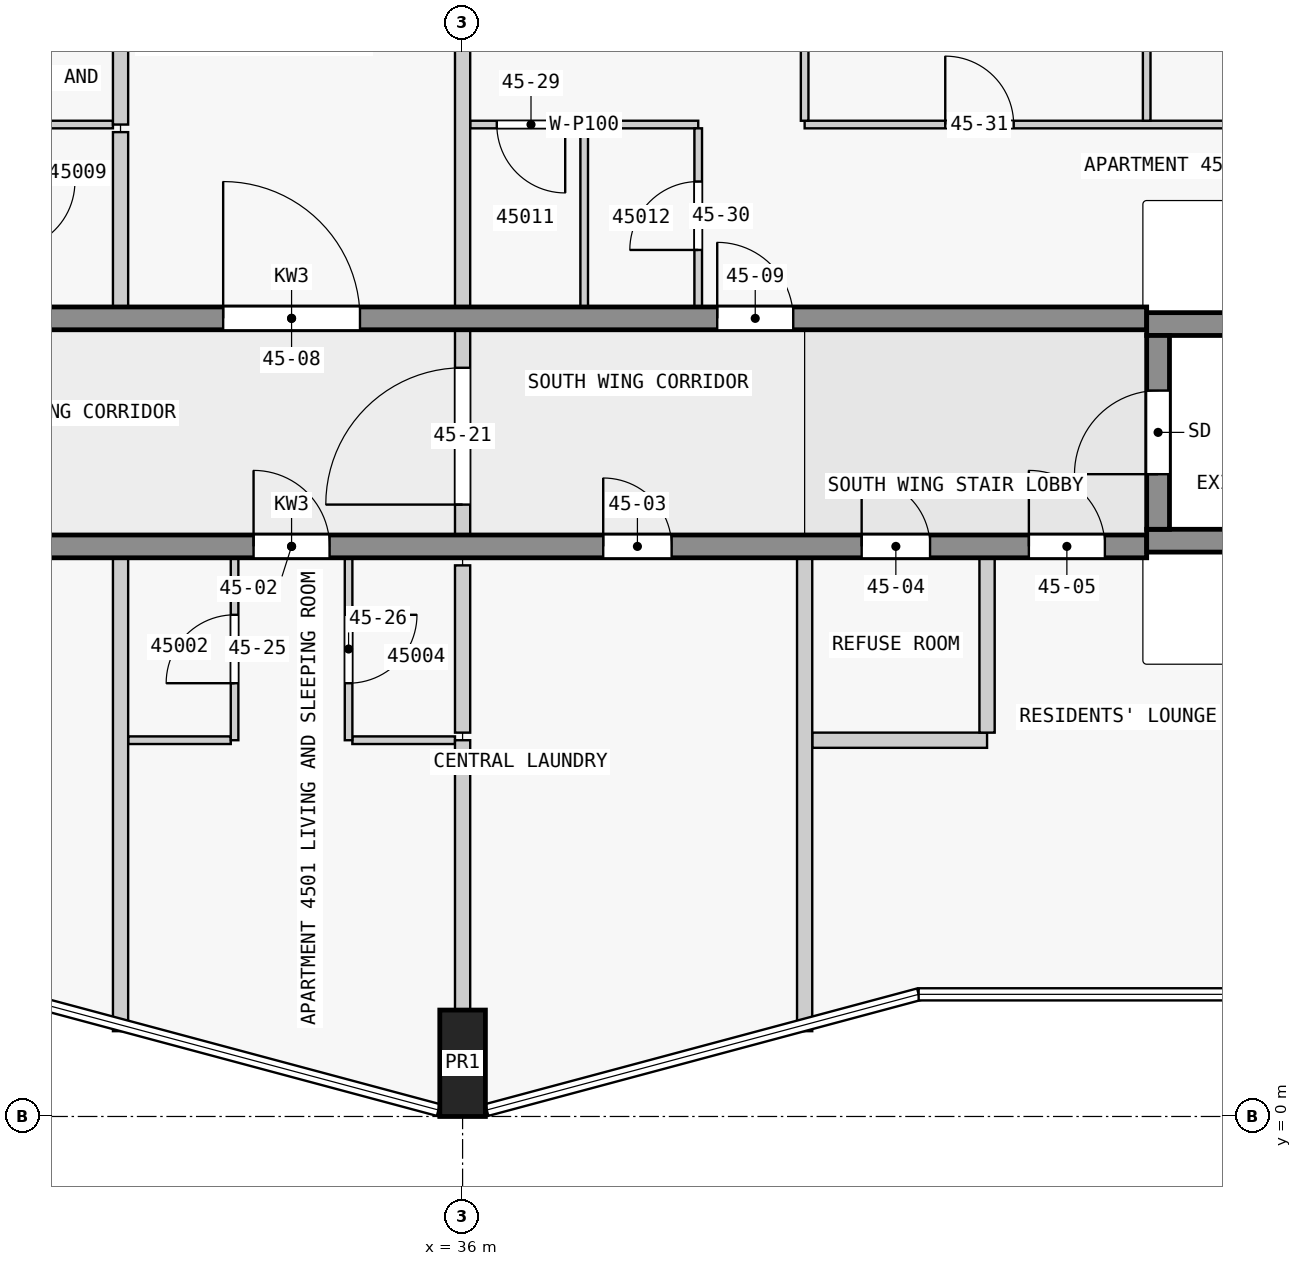
"""IFC4 building model, lengths in metres.
Left out: names, types, materials, properties, quantities, classifications, styles, units other than length and angle.
Written with IfcOpenShell. Run it as: python <this file> out.ifc"""

import sys

from ifc_helpers import new_model, si_unit, direction, frame, frame_2d, origin, origin_2d, place, context, subcontext, project, spatial, rectangle, extrude, element, fill, save


model = new_model("IFC4")
c1 = context("Model", 3, precision=1e-05, world=origin(), true_north=direction((0.0, 1.0)))
c2 = subcontext(c1, "Body", "Model", "MODEL_VIEW")
j1 = project(units=[si_unit("LENGTHUNIT", "METRE"), si_unit("PLANEANGLEUNIT", "RADIAN")], contexts=[c1])
p1 = place(None, origin())
s1 = spatial("IfcSite", under=j1, at=p1, CompositionType="ELEMENT")
p2 = place(p1, origin())
s2 = spatial("IfcBuilding", under=s1, at=p2, CompositionType="ELEMENT")
p3 = place(p2, frame((0.0, 0.0, 174.4)))
s3 = spatial("IfcBuildingStorey", under=s2, at=p3, CompositionType="ELEMENT", Elevation=174.4)
p4 = place(p3, frame((36.0, 0.7, 0.0), z_axis=(0.0, 0.0, 1.0), x_axis=(1.0, 0.0, 0.0)))
e1 = element("IfcColumn", 1, at=p4, inside=s3, PredefinedType="COLUMN", context=c2, shape_type="SweptSolid", body=[
    extrude(rectangle(XDim=0.6, YDim=1.4, at=origin_2d()), origin(), (0.0, 0.0, 1.0), 3.5),
])
p5 = place(p3, frame((45.15, 7.725, 0.0), z_axis=(0.0, 0.0, 1.0), x_axis=(0.0, 1.0, 0.0)))
e2 = element("IfcWall", 2, at=p5, inside=s3, PredefinedType="SHEAR", context=c2, shape_type="SweptSolid", body=[
    extrude(rectangle(XDim=2.55, YDim=0.3, at=frame_2d((1.275, 0.0))), origin(), (0.0, 0.0, 1.0), 3.5),
])
p6 = place(p5, frame((0.725, 0.0, 0.0)))
e3 = element("IfcOpeningElement", 3, at=p6, cuts=e2, PredefinedType="OPENING", context=c2, shape_type="SweptSolid", body=[
    extrude(rectangle(XDim=1.1, YDim=2.1, at=frame_2d((0.55, 1.05))), frame((0.0, 0.16, 0.0), z_axis=(0.0, -1.0, 0.0), x_axis=(1.0, 0.0, 0.0)), (0.0, 0.0, 1.0), 0.32),
])
for number, where, z_axis, x_axis in (
    (4, (45.0, 7.575, 0.0), (0.0, 0.0, 1.0), (1.0, 0.0, 0.0)),
    (5, (45.0, 10.425, 0.0), (0.0, 0.0, 1.0), (1.0, 0.0, 0.0)),
):
    element("IfcWall", number, at=place(p3, frame(where, z_axis=z_axis, x_axis=x_axis)), inside=s3, PredefinedType="SHEAR", context=c2, shape_type="SweptSolid", body=[
        extrude(rectangle(XDim=7.2, YDim=0.3, at=frame_2d((3.6, 0.0))), origin(), (0.0, 0.0, 1.0), 3.5),
    ])
p7 = place(p3, frame((22.5, 7.5, 0.0), z_axis=(0.0, 0.0, 1.0), x_axis=(1.0, 0.0, 0.0)))
e6 = element("IfcWall", 6, at=p7, inside=s3, PredefinedType="SHEAR", context=c2, shape_type="SweptSolid", body=[
    extrude(rectangle(XDim=22.5, YDim=0.3, at=frame_2d((11.25, 0.0))), origin(), (0.0, 0.0, 1.0), 3.25),
])
p8 = place(p7, frame((4.05, 0.0, 0.0)))
e7 = element("IfcOpeningElement", 7, at=p8, cuts=e6, PredefinedType="OPENING", context=c2, shape_type="SweptSolid", body=[
    extrude(rectangle(XDim=1.0, YDim=2.1, at=frame_2d((0.5, 1.05))), frame((0.0, 0.16, 0.0), z_axis=(0.0, -1.0, 0.0), x_axis=(1.0, 0.0, 0.0)), (0.0, 0.0, 1.0), 0.32),
])
p9 = place(p7, frame((10.75, 0.0, 0.0)))
e8 = element("IfcOpeningElement", 8, at=p9, cuts=e6, PredefinedType="OPENING", context=c2, shape_type="SweptSolid", body=[
    extrude(rectangle(XDim=1.0, YDim=2.1, at=frame_2d((0.5, 1.05))), frame((0.0, 0.16, 0.0), z_axis=(0.0, -1.0, 0.0), x_axis=(1.0, 0.0, 0.0)), (0.0, 0.0, 1.0), 0.32),
])
p10 = place(p7, frame((15.35, 0.0, 0.0)))
e9 = element("IfcOpeningElement", 9, at=p10, cuts=e6, PredefinedType="OPENING", context=c2, shape_type="SweptSolid", body=[
    extrude(rectangle(XDim=0.9, YDim=2.1, at=frame_2d((0.45, 1.05))), frame((0.0, 0.16, 0.0), z_axis=(0.0, -1.0, 0.0), x_axis=(1.0, 0.0, 0.0)), (0.0, 0.0, 1.0), 0.32),
])
p11 = place(p7, frame((18.75, 0.0, 0.0)))
e10 = element("IfcOpeningElement", 10, at=p11, cuts=e6, PredefinedType="OPENING", context=c2, shape_type="SweptSolid", body=[
    extrude(rectangle(XDim=0.9, YDim=2.1, at=frame_2d((0.45, 1.05))), frame((0.0, 0.16, 0.0), z_axis=(0.0, -1.0, 0.0), x_axis=(1.0, 0.0, 0.0)), (0.0, 0.0, 1.0), 0.32),
])
p12 = place(p7, frame((20.95, 0.0, 0.0)))
e11 = element("IfcOpeningElement", 11, at=p12, cuts=e6, PredefinedType="OPENING", context=c2, shape_type="SweptSolid", body=[
    extrude(rectangle(XDim=1.0, YDim=2.1, at=frame_2d((0.5, 1.05))), frame((0.0, 0.16, 0.0), z_axis=(0.0, -1.0, 0.0), x_axis=(1.0, 0.0, 0.0)), (0.0, 0.0, 1.0), 0.32),
])
p13 = place(p3, frame((22.5, 10.5, 0.0), z_axis=(0.0, 0.0, 1.0), x_axis=(1.0, 0.0, 0.0)))
e12 = element("IfcWall", 12, at=p13, inside=s3, PredefinedType="SHEAR", context=c2, shape_type="SweptSolid", body=[
    extrude(rectangle(XDim=22.5, YDim=0.3, at=frame_2d((11.25, 0.0))), origin(), (0.0, 0.0, 1.0), 3.25),
])
p14 = place(p13, frame((1.85, 0.0, 0.0)))
e13 = element("IfcOpeningElement", 13, at=p14, cuts=e12, PredefinedType="OPENING", context=c2, shape_type="SweptSolid", body=[
    extrude(rectangle(XDim=0.9, YDim=2.1, at=frame_2d((0.45, 1.05))), frame((0.0, 0.16, 0.0), z_axis=(0.0, -1.0, 0.0), x_axis=(1.0, 0.0, 0.0)), (0.0, 0.0, 1.0), 0.32),
])
p15 = place(p13, frame((6.25, 0.0, 0.0)))
e14 = element("IfcOpeningElement", 14, at=p15, cuts=e12, PredefinedType="OPENING", context=c2, shape_type="SweptSolid", body=[
    extrude(rectangle(XDim=1.0, YDim=2.1, at=frame_2d((0.5, 1.05))), frame((0.0, 0.16, 0.0), z_axis=(0.0, -1.0, 0.0), x_axis=(1.0, 0.0, 0.0)), (0.0, 0.0, 1.0), 0.32),
])
p16 = place(p13, frame((10.35, 0.0, 0.0)))
e15 = element("IfcOpeningElement", 15, at=p16, cuts=e12, PredefinedType="OPENING", context=c2, shape_type="SweptSolid", body=[
    extrude(rectangle(XDim=1.8, YDim=2.1, at=frame_2d((0.9, 1.05))), frame((0.0, 0.16, 0.0), z_axis=(0.0, -1.0, 0.0), x_axis=(1.0, 0.0, 0.0)), (0.0, 0.0, 1.0), 0.32),
])
p17 = place(p13, frame((16.85, 0.0, 0.0)))
e16 = element("IfcOpeningElement", 16, at=p17, cuts=e12, PredefinedType="OPENING", context=c2, shape_type="SweptSolid", body=[
    extrude(rectangle(XDim=1.0, YDim=2.1, at=frame_2d((0.5, 1.05))), frame((0.0, 0.16, 0.0), z_axis=(0.0, -1.0, 0.0), x_axis=(1.0, 0.0, 0.0)), (0.0, 0.0, 1.0), 0.32),
])
for number, where, z_axis, x_axis in (
    (17, (31.6, 4.95, 0.0), (0.0, 0.0, 1.0), (1.0, 0.0, 0.0)),
    (18, (34.55, 4.95, 0.0), (0.0, 0.0, 1.0), (1.0, 0.0, 0.0)),
):
    element("IfcWall", number, at=place(p3, frame(where, z_axis=z_axis, x_axis=x_axis)), inside=s3, PredefinedType="PARTITIONING", context=c2, shape_type="SweptSolid", body=[
        extrude(rectangle(XDim=1.35, YDim=0.1, at=frame_2d((0.675, 0.0))), origin(), (0.0, 0.0, 1.0), 3.25),
    ])
p18 = place(p3, frame((40.6, 4.95, 0.0), z_axis=(0.0, 0.0, 1.0), x_axis=(1.0, 0.0, 0.0)))
e19 = element("IfcWall", 19, at=p18, inside=s3, PredefinedType="PARTITIONING", context=c2, shape_type="SweptSolid", body=[
    extrude(rectangle(XDim=2.3, YDim=0.2, at=frame_2d((1.15, 0.0))), origin(), (0.0, 0.0, 1.0), 3.25),
])
p19 = place(p3, frame((31.4, 13.05, 0.0), z_axis=(0.0, 0.0, 1.0), x_axis=(-1.0, 0.0, 0.0)))
e20 = element("IfcWall", 20, at=p19, inside=s3, PredefinedType="PARTITIONING", context=c2, shape_type="SweptSolid", body=[
    extrude(rectangle(XDim=1.35, YDim=0.1, at=frame_2d((0.675, 0.0))), origin(), (0.0, 0.0, 1.0), 3.25),
])
p20 = place(p3, frame((39.1, 13.05, 0.0), z_axis=(0.0, 0.0, 1.0), x_axis=(-1.0, 0.0, 0.0)))
e21 = element("IfcWall", 21, at=p20, inside=s3, PredefinedType="PARTITIONING", context=c2, shape_type="SweptSolid", body=[
    extrude(rectangle(XDim=3.0, YDim=0.1, at=frame_2d((1.5, 0.0))), origin(), (0.0, 0.0, 1.0), 3.25),
])
p21 = place(p20, frame((1.75, 0.0, 0.0)))
e22 = element("IfcOpeningElement", 22, at=p21, cuts=e21, PredefinedType="OPENING", context=c2, shape_type="SweptSolid", body=[
    extrude(rectangle(XDim=0.9, YDim=2.1, at=frame_2d((0.45, 1.05))), frame((0.0, 0.06, 0.0), z_axis=(0.0, -1.0, 0.0), x_axis=(1.0, 0.0, 0.0)), (0.0, 0.0, 1.0), 0.12),
])
p22 = place(p3, frame((40.5, 13.05, 0.0), z_axis=(0.0, 0.0, 1.0), x_axis=(1.0, 0.0, 0.0)))
e23 = element("IfcWall", 23, at=p22, inside=s3, PredefinedType="PARTITIONING", context=c2, shape_type="SweptSolid", body=[
    extrude(rectangle(XDim=13.58, YDim=0.1, at=frame_2d((6.79, 0.0))), origin(), (0.0, 0.0, 1.0), 3.25),
])
p23 = place(p22, frame((1.85, 0.0, 0.0)))
e24 = element("IfcOpeningElement", 24, at=p23, cuts=e23, PredefinedType="OPENING", context=c2, shape_type="SweptSolid", body=[
    extrude(rectangle(XDim=0.9, YDim=2.1, at=frame_2d((0.45, 1.05))), frame((0.0, 0.06, 0.0), z_axis=(0.0, -1.0, 0.0), x_axis=(1.0, 0.0, 0.0)), (0.0, 0.0, 1.0), 0.12),
])
p24 = place(p22, frame((6.35, 0.0, 0.0)))
e25 = element("IfcOpeningElement", 25, at=p24, cuts=e23, PredefinedType="OPENING", context=c2, shape_type="SweptSolid", body=[
    extrude(rectangle(XDim=0.9, YDim=2.1, at=frame_2d((0.45, 1.05))), frame((0.0, 0.06, 0.0), z_axis=(0.0, -1.0, 0.0), x_axis=(1.0, 0.0, 0.0)), (0.0, 0.0, 1.0), 0.12),
])
p25 = place(p22, frame((10.75, 0.0, 0.0)))
e26 = element("IfcOpeningElement", 26, at=p25, cuts=e23, PredefinedType="OPENING", context=c2, shape_type="SweptSolid", body=[
    extrude(rectangle(XDim=0.9, YDim=2.1, at=frame_2d((0.45, 1.05))), frame((0.0, 0.06, 0.0), z_axis=(0.0, -1.0, 0.0), x_axis=(1.0, 0.0, 0.0)), (0.0, 0.0, 1.0), 0.12),
])
p26 = place(p3, frame((31.5, 16.878, 0.0), z_axis=(0.0, 0.0, 1.0), x_axis=(0.0, -1.0, 0.0)))
e27 = element("IfcWall", 27, at=p26, inside=s3, PredefinedType="PARTITIONING", context=c2, shape_type="SweptSolid", body=[
    extrude(rectangle(XDim=3.828, YDim=0.2, at=frame_2d((1.914, 0.0))), origin(), (0.0, 0.0, 1.0), 3.25),
])
p27 = place(p3, frame((31.5, 1.122, 0.0), z_axis=(0.0, 0.0, 1.0), x_axis=(0.0, 1.0, 0.0)))
e28 = element("IfcWall", 28, at=p27, inside=s3, PredefinedType="PARTITIONING", context=c2, shape_type="SweptSolid", body=[
    extrude(rectangle(XDim=6.228, YDim=0.2, at=frame_2d((3.114, 0.0))), origin(), (0.0, 0.0, 1.0), 3.25),
])
p28 = place(p3, frame((31.5, 10.65, 0.0), z_axis=(0.0, 0.0, 1.0), x_axis=(0.0, 1.0, 0.0)))
e29 = element("IfcWall", 29, at=p28, inside=s3, PredefinedType="PARTITIONING", context=c2, shape_type="SweptSolid", body=[
    extrude(rectangle(XDim=2.3, YDim=0.2, at=frame_2d((1.15, 0.0))), origin(), (0.0, 0.0, 1.0), 3.25),
])
p29 = place(p3, frame((33.0, 4.95, 0.0), z_axis=(0.0, 0.0, 1.0), x_axis=(0.0, 1.0, 0.0)))
e30 = element("IfcWall", 30, at=p29, inside=s3, PredefinedType="PARTITIONING", context=c2, shape_type="SweptSolid", body=[
    extrude(rectangle(XDim=2.4, YDim=0.1, at=frame_2d((1.2, 0.0))), origin(), (0.0, 0.0, 1.0), 3.25),
])
p30 = place(p29, frame((0.75, 0.0, 0.0)))
e31 = element("IfcOpeningElement", 31, at=p30, cuts=e30, PredefinedType="OPENING", context=c2, shape_type="SweptSolid", body=[
    extrude(rectangle(XDim=0.9, YDim=2.1, at=frame_2d((0.45, 1.05))), frame((0.0, 0.06, 0.0), z_axis=(0.0, -1.0, 0.0), x_axis=(1.0, 0.0, 0.0)), (0.0, 0.0, 1.0), 0.12),
])
p31 = place(p3, frame((34.5, 7.35, 0.0), z_axis=(0.0, 0.0, 1.0), x_axis=(0.0, -1.0, 0.0)))
e32 = element("IfcWall", 32, at=p31, inside=s3, PredefinedType="PARTITIONING", context=c2, shape_type="SweptSolid", body=[
    extrude(rectangle(XDim=2.4, YDim=0.1, at=frame_2d((1.2, 0.0))), origin(), (0.0, 0.0, 1.0), 3.25),
])
p32 = place(p31, frame((0.75, 0.0, 0.0)))
e33 = element("IfcOpeningElement", 33, at=p32, cuts=e32, PredefinedType="OPENING", context=c2, shape_type="SweptSolid", body=[
    extrude(rectangle(XDim=0.9, YDim=2.1, at=frame_2d((0.45, 1.05))), frame((0.0, 0.06, 0.0), z_axis=(0.0, -1.0, 0.0), x_axis=(1.0, 0.0, 0.0)), (0.0, 0.0, 1.0), 0.12),
])
p33 = place(p3, frame((36.0, 4.95, 0.0), z_axis=(0.0, 0.0, 1.0), x_axis=(0.0, -1.0, 0.0)))
e34 = element("IfcWall", 34, at=p33, inside=s3, PredefinedType="PARTITIONING", context=c2, shape_type="SweptSolid", body=[
    extrude(rectangle(XDim=3.55, YDim=0.2, at=frame_2d((1.775, 0.0))), origin(), (0.0, 0.0, 1.0), 3.25),
])
p34 = place(p3, frame((36.0, 5.05, 0.0), z_axis=(0.0, 0.0, 1.0), x_axis=(0.0, 1.0, 0.0)))
e35 = element("IfcWall", 35, at=p34, inside=s3, PredefinedType="PARTITIONING", context=c2, shape_type="SweptSolid", body=[
    extrude(rectangle(XDim=2.2, YDim=0.2, at=frame_2d((1.1, 0.0))), origin(), (0.0, 0.0, 1.0), 3.25),
])
p35 = place(p3, frame((36.0, 10.65, 0.0), z_axis=(0.0, 0.0, 1.0), x_axis=(0.0, 1.0, 0.0)))
e36 = element("IfcWall", 36, at=p35, inside=s3, PredefinedType="PARTITIONING", context=c2, shape_type="SweptSolid", body=[
    extrude(rectangle(XDim=5.95, YDim=0.2, at=frame_2d((2.975, 0.0))), origin(), (0.0, 0.0, 1.0), 3.25),
])
p36 = place(p3, frame((37.6, 10.65, 0.0), z_axis=(0.0, 0.0, 1.0), x_axis=(0.0, 1.0, 0.0)))
e37 = element("IfcWall", 37, at=p36, inside=s3, PredefinedType="PARTITIONING", context=c2, shape_type="SweptSolid", body=[
    extrude(rectangle(XDim=2.35, YDim=0.1, at=frame_2d((1.175, 0.0))), origin(), (0.0, 0.0, 1.0), 3.25),
])
p37 = place(p3, frame((39.1, 10.65, 0.0), z_axis=(0.0, 0.0, 1.0), x_axis=(0.0, 1.0, 0.0)))
e38 = element("IfcWall", 38, at=p37, inside=s3, PredefinedType="PARTITIONING", context=c2, shape_type="SweptSolid", body=[
    extrude(rectangle(XDim=2.35, YDim=0.1, at=frame_2d((1.175, 0.0))), origin(), (0.0, 0.0, 1.0), 3.25),
])
p38 = place(p37, frame((0.75, 0.0, 0.0)))
e39 = element("IfcOpeningElement", 39, at=p38, cuts=e38, PredefinedType="OPENING", context=c2, shape_type="SweptSolid", body=[
    extrude(rectangle(XDim=0.9, YDim=2.1, at=frame_2d((0.45, 1.05))), frame((0.0, 0.06, 0.0), z_axis=(0.0, -1.0, 0.0), x_axis=(1.0, 0.0, 0.0)), (0.0, 0.0, 1.0), 0.12),
])
p39 = place(p3, frame((40.5, 16.878, 0.0), z_axis=(0.0, 0.0, 1.0), x_axis=(0.0, -1.0, 0.0)))
e40 = element("IfcWall", 40, at=p39, inside=s3, PredefinedType="PARTITIONING", context=c2, shape_type="SweptSolid", body=[
    extrude(rectangle(XDim=3.778, YDim=0.1, at=frame_2d((1.889, 0.0))), origin(), (0.0, 0.0, 1.0), 3.25),
])
p40 = place(p3, frame((40.5, 1.122, 0.0), z_axis=(0.0, 0.0, 1.0), x_axis=(0.0, 1.0, 0.0)))
e41 = element("IfcWall", 41, at=p40, inside=s3, PredefinedType="PARTITIONING", context=c2, shape_type="SweptSolid", body=[
    extrude(rectangle(XDim=6.228, YDim=0.2, at=frame_2d((3.114, 0.0))), origin(), (0.0, 0.0, 1.0), 3.25),
])
p41 = place(p3, frame((42.9, 5.05, 0.0), z_axis=(0.0, 0.0, 1.0), x_axis=(0.0, 1.0, 0.0)))
e42 = element("IfcWall", 42, at=p41, inside=s3, PredefinedType="PARTITIONING", context=c2, shape_type="SweptSolid", body=[
    extrude(rectangle(XDim=2.3, YDim=0.2, at=frame_2d((1.15, 0.0))), origin(), (0.0, 0.0, 1.0), 3.25),
])
p42 = place(p3, frame((45.0, 13.1, 0.0), z_axis=(0.0, 0.0, 1.0), x_axis=(0.0, 1.0, 0.0)))
e43 = element("IfcWall", 43, at=p42, inside=s3, PredefinedType="PARTITIONING", context=c2, shape_type="SweptSolid", body=[
    extrude(rectangle(XDim=3.373, YDim=0.1, at=frame_2d((1.687, 0.0))), origin(), (0.0, 0.0, 1.0), 3.25),
])
p43 = place(p3, frame((36.0, 7.35, 0.0), z_axis=(0.0, 0.0, 1.0), x_axis=(0.0, 1.0, 0.0)))
e44 = element("IfcWall", 44, at=p43, inside=s3, PredefinedType="PARTITIONING", context=c2, shape_type="SweptSolid", body=[
    extrude(rectangle(XDim=3.2, YDim=0.2, at=frame_2d((1.6, 0.0))), origin(), (0.0, 0.0, 1.0), 3.25),
])
p44 = place(p43, frame((0.7, 0.0, 0.0)))
e45 = element("IfcOpeningElement", 45, at=p44, cuts=e44, PredefinedType="OPENING", context=c2, shape_type="SweptSolid", body=[
    extrude(rectangle(XDim=1.8, YDim=2.1, at=frame_2d((0.9, 1.05))), frame((0.0, 0.11, 0.0), z_axis=(0.0, -1.0, 0.0), x_axis=(1.0, 0.0, 0.0)), (0.0, 0.0, 1.0), 0.22),
])
p45 = place(p6, origin())
e46 = element("IfcDoor", 46, at=p45, inside=s3, OperationType="SINGLE_SWING_LEFT", PredefinedType="DOOR", context=c2, shape_type="SweptSolid", body=[
    extrude(rectangle(XDim=1.1, YDim=2.1, at=frame_2d((0.55, 1.05))), frame((0.0, 0.025, 0.0), z_axis=(0.0, -1.0, 0.0), x_axis=(1.0, 0.0, 0.0)), (0.0, 0.0, 1.0), 0.05),
])
fill(e3, e46)
p46 = place(p9, origin())
e47 = element("IfcDoor", 47, at=p46, inside=s3, OperationType="SINGLE_SWING_LEFT", PredefinedType="DOOR", context=c2, shape_type="SweptSolid", body=[
    extrude(rectangle(XDim=1.0, YDim=2.1, at=frame_2d((0.5, 1.05))), frame((0.0, 0.025, 0.0), z_axis=(0.0, -1.0, 0.0), x_axis=(1.0, 0.0, 0.0)), (0.0, 0.0, 1.0), 0.05),
])
fill(e8, e47)
p47 = place(p10, origin())
e48 = element("IfcDoor", 48, at=p47, inside=s3, OperationType="SINGLE_SWING_RIGHT", PredefinedType="DOOR", context=c2, shape_type="SweptSolid", body=[
    extrude(rectangle(XDim=0.9, YDim=2.1, at=frame_2d((0.45, 1.05))), frame((0.0, 0.025, 0.0), z_axis=(0.0, -1.0, 0.0), x_axis=(1.0, 0.0, 0.0)), (0.0, 0.0, 1.0), 0.05),
])
fill(e9, e48)
p48 = place(p11, origin())
e49 = element("IfcDoor", 49, at=p48, inside=s3, OperationType="SINGLE_SWING_RIGHT", PredefinedType="DOOR", context=c2, shape_type="SweptSolid", body=[
    extrude(rectangle(XDim=0.9, YDim=2.1, at=frame_2d((0.45, 1.05))), frame((0.0, 0.025, 0.0), z_axis=(0.0, -1.0, 0.0), x_axis=(1.0, 0.0, 0.0)), (0.0, 0.0, 1.0), 0.05),
])
fill(e10, e49)
p49 = place(p12, origin())
e50 = element("IfcDoor", 50, at=p49, inside=s3, OperationType="SINGLE_SWING_RIGHT", PredefinedType="DOOR", context=c2, shape_type="SweptSolid", body=[
    extrude(rectangle(XDim=1.0, YDim=2.1, at=frame_2d((0.5, 1.05))), frame((0.0, 0.025, 0.0), z_axis=(0.0, -1.0, 0.0), x_axis=(1.0, 0.0, 0.0)), (0.0, 0.0, 1.0), 0.05),
])
fill(e11, e50)
p50 = place(p16, origin())
e51 = element("IfcDoor", 51, at=p50, inside=s3, OperationType="SINGLE_SWING_LEFT", PredefinedType="DOOR", context=c2, shape_type="SweptSolid", body=[
    extrude(rectangle(XDim=1.8, YDim=2.1, at=frame_2d((0.9, 1.05))), frame((0.0, 0.025, 0.0), z_axis=(0.0, -1.0, 0.0), x_axis=(1.0, 0.0, 0.0)), (0.0, 0.0, 1.0), 0.05),
])
fill(e15, e51)
p51 = place(p17, origin())
e52 = element("IfcDoor", 52, at=p51, inside=s3, OperationType="SINGLE_SWING_RIGHT", PredefinedType="DOOR", context=c2, shape_type="SweptSolid", body=[
    extrude(rectangle(XDim=1.0, YDim=2.1, at=frame_2d((0.5, 1.05))), frame((0.0, 0.025, 0.0), z_axis=(0.0, -1.0, 0.0), x_axis=(1.0, 0.0, 0.0)), (0.0, 0.0, 1.0), 0.05),
])
fill(e16, e52)
p52 = place(p44, origin())
e53 = element("IfcDoor", 53, at=p52, inside=s3, OperationType="SINGLE_SWING_LEFT", PredefinedType="DOOR", context=c2, shape_type="SweptSolid", body=[
    extrude(rectangle(XDim=1.8, YDim=2.1, at=frame_2d((0.9, 1.05))), frame((0.0, 0.025, 0.0), z_axis=(0.0, -1.0, 0.0), x_axis=(1.0, 0.0, 0.0)), (0.0, 0.0, 1.0), 0.05),
])
fill(e45, e53)
p53 = place(p30, origin())
e54 = element("IfcDoor", 54, at=p53, inside=s3, OperationType="SINGLE_SWING_RIGHT", PredefinedType="DOOR", context=c2, shape_type="SweptSolid", body=[
    extrude(rectangle(XDim=0.9, YDim=2.1, at=frame_2d((0.45, 1.05))), frame((0.0, 0.025, 0.0), z_axis=(0.0, -1.0, 0.0), x_axis=(1.0, 0.0, 0.0)), (0.0, 0.0, 1.0), 0.05),
])
fill(e31, e54)
p54 = place(p32, origin())
e55 = element("IfcDoor", 55, at=p54, inside=s3, OperationType="SINGLE_SWING_RIGHT", PredefinedType="DOOR", context=c2, shape_type="SweptSolid", body=[
    extrude(rectangle(XDim=0.9, YDim=2.1, at=frame_2d((0.45, 1.05))), frame((0.0, 0.025, 0.0), z_axis=(0.0, -1.0, 0.0), x_axis=(1.0, 0.0, 0.0)), (0.0, 0.0, 1.0), 0.05),
])
fill(e33, e55)
p55 = place(p21, origin())
e56 = element("IfcDoor", 56, at=p55, inside=s3, OperationType="SINGLE_SWING_RIGHT", PredefinedType="DOOR", context=c2, shape_type="SweptSolid", body=[
    extrude(rectangle(XDim=0.9, YDim=2.1, at=frame_2d((0.45, 1.05))), frame((0.0, 0.025, 0.0), z_axis=(0.0, -1.0, 0.0), x_axis=(1.0, 0.0, 0.0)), (0.0, 0.0, 1.0), 0.05),
])
fill(e22, e56)
p56 = place(p38, origin())
e57 = element("IfcDoor", 57, at=p56, inside=s3, OperationType="SINGLE_SWING_RIGHT", PredefinedType="DOOR", context=c2, shape_type="SweptSolid", body=[
    extrude(rectangle(XDim=0.9, YDim=2.1, at=frame_2d((0.45, 1.05))), frame((0.0, 0.025, 0.0), z_axis=(0.0, -1.0, 0.0), x_axis=(1.0, 0.0, 0.0)), (0.0, 0.0, 1.0), 0.05),
])
fill(e39, e57)
p57 = place(p23, origin())
e58 = element("IfcDoor", 58, at=p57, inside=s3, OperationType="SINGLE_SWING_LEFT", PredefinedType="DOOR", context=c2, shape_type="SweptSolid", body=[
    extrude(rectangle(XDim=0.9, YDim=2.1, at=frame_2d((0.45, 1.05))), frame((0.0, 0.025, 0.0), z_axis=(0.0, -1.0, 0.0), x_axis=(1.0, 0.0, 0.0)), (0.0, 0.0, 1.0), 0.05),
])
fill(e24, e58)
save(model, sys.argv[1])
